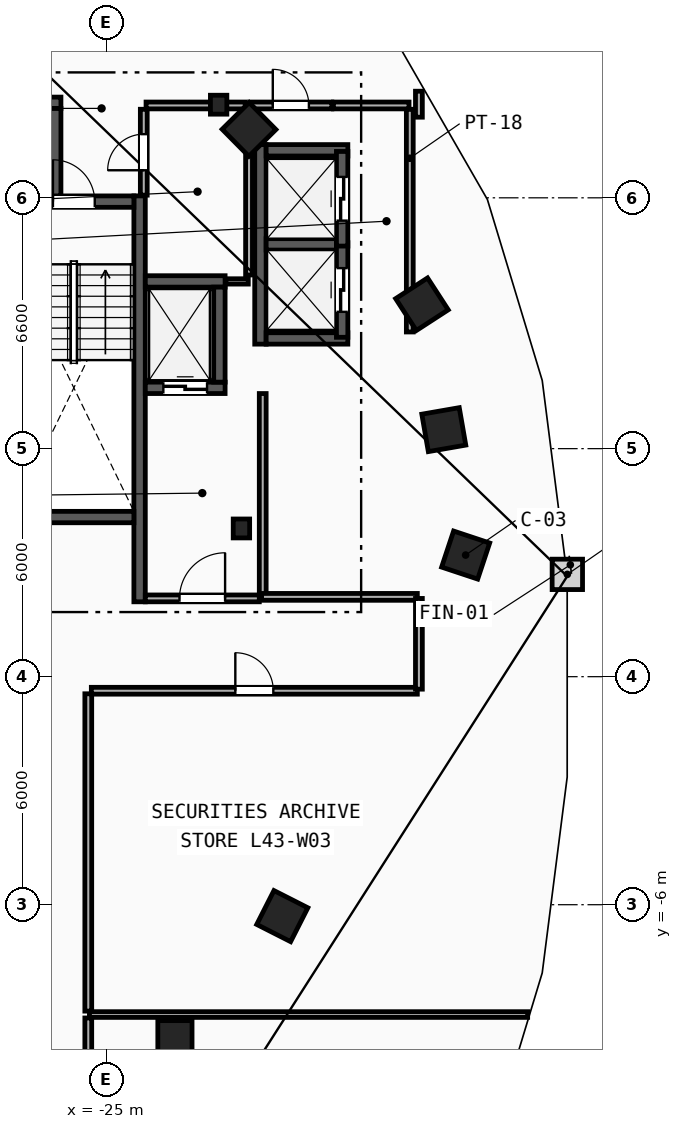
"""IFC4 building model, lengths in metres.
Left out: names, types, materials, properties, quantities, classifications, styles, units other than length and angle.
Written with IfcOpenShell. Run it as: python <this file> out.ifc"""

import sys

from ifc_helpers import new_model, si_unit, direction, frame, frame_2d, origin, origin_2d, place, context, subcontext, project, spatial, rectangle, i_section, extrude, element, fill, save


model = new_model("IFC4")
c1 = context("Model", 3, precision=1e-05, world=origin(), true_north=direction((0.0, 1.0)))
c2 = subcontext(c1, "Body", "Model", "MODEL_VIEW")
j1 = project(units=[si_unit("LENGTHUNIT", "METRE"), si_unit("PLANEANGLEUNIT", "RADIAN")], contexts=[c1])
p1 = place(None, origin())
s1 = spatial("IfcSite", under=j1, at=p1, CompositionType="ELEMENT")
p2 = place(p1, origin())
s2 = spatial("IfcBuilding", under=s1, at=p2, CompositionType="ELEMENT")
p3 = place(p2, frame((0.0, 0.0, 165.6)))
s3 = spatial("IfcBuildingStorey", under=s2, at=p3, CompositionType="ELEMENT", Elevation=165.6)
for number, where, z_axis, x_axis in (
    (1, (-21.45, 3.9, 0.0), (0.0, 0.0, 1.0), (1.0, 0.0, 0.0)),
    (2, (-22.05, 15.05, 0.0), (0.0, 0.0, 1.0), (1.0, 0.0, 0.0)),
):
    element("IfcColumn", number, at=place(p3, frame(where, z_axis=z_axis, x_axis=x_axis)), inside=s3, PredefinedType="COLUMN", context=c2, shape_type="SweptSolid", body=[
        extrude(i_section(OverallWidth=0.432, OverallDepth=0.498, WebThickness=0.056, FlangeThickness=0.089, FilletRadius=0.018, at=origin_2d()), origin(), (0.0, 0.0, 1.0), 3.6),
    ])
p4 = place(p3, frame((-23.2, -9.5, 0.0), z_axis=(0.0, 0.0, 1.0), x_axis=(1.0, 0.0, 0.0)))
e3 = element("IfcColumn", 3, at=p4, inside=s3, PredefinedType="COLUMN", context=c2, shape_type="SweptSolid", body=[
    extrude(rectangle(XDim=0.9, YDim=0.9, at=origin_2d()), origin(), (0.0, 0.0, 1.0), 3.6),
])
for number, where, z_axis, x_axis in (
    (4, (-15.55, 3.2, 0.0), (0.0, 0.0, 1.0), (0.315, 0.949, 0.0)),
    (5, (-16.125, 6.5, 0.0), (0.0, 0.0, 1.0), (-0.172, 0.985, 0.0)),
    (6, (-16.7, 9.8, 0.0), (0.0, 0.0, 1.0), (-0.544, 0.839, 0.0)),
    (7, (-21.25, 14.4, 0.0), (0.0, 0.0, 1.0), (-0.703, 0.711, 0.0)),
    (8, (-20.375, -6.3, 0.0), (0.0, 0.0, 1.0), (0.453, 0.892, 0.0)),
):
    element("IfcColumn", number, at=place(p3, frame(where, z_axis=z_axis, x_axis=x_axis)), inside=s3, PredefinedType="COLUMN", context=c2, shape_type="SweptSolid", body=[
        extrude(rectangle(XDim=1.0, YDim=1.0, at=origin_2d()), origin(), (0.0, 0.0, 1.0), 3.6),
    ])
p5 = place(p3, frame((-24.13, 1.97, 0.0), z_axis=(0.0, 0.0, 1.0), x_axis=(0.0, 1.0, 0.0)))
e9 = element("IfcWall", 9, at=p5, inside=s3, PredefinedType="SHEAR", context=c2, shape_type="SweptSolid", body=[
    extrude(rectangle(XDim=10.68, YDim=0.3, at=frame_2d((5.34, 0.0))), origin(), (0.0, 0.0, 1.0), 3.36),
])
p6 = place(p3, frame((-27.44, 12.5, 0.0), z_axis=(0.0, 0.0, 1.0), x_axis=(1.0, 0.0, 0.0)))
e10 = element("IfcWall", 10, at=p6, inside=s3, PredefinedType="SHEAR", context=c2, shape_type="SweptSolid", body=[
    extrude(rectangle(XDim=3.16, YDim=0.3, at=frame_2d((1.58, 0.0))), origin(), (0.0, 0.0, 1.0), 3.36),
])
p7 = place(p6, frame((1.03, 0.0, 0.0)))
e11 = element("IfcOpeningElement", 11, at=p7, cuts=e10, PredefinedType="OPENING", context=c2, shape_type="SweptSolid", body=[
    extrude(rectangle(XDim=1.1, YDim=2.15, at=frame_2d((0.55, 1.075))), frame((0.0, 0.16, 0.0), z_axis=(0.0, -1.0, 0.0), x_axis=(1.0, 0.0, 0.0)), (0.0, 0.0, 1.0), 0.32),
])
p8 = place(p3, frame((-27.44, 4.2, 0.0), z_axis=(0.0, 0.0, 1.0), x_axis=(1.0, 0.0, 0.0)))
e12 = element("IfcWall", 12, at=p8, inside=s3, PredefinedType="SHEAR", context=c2, shape_type="SweptSolid", body=[
    extrude(rectangle(XDim=3.16, YDim=0.3, at=frame_2d((1.58, 0.0))), origin(), (0.0, 0.0, 1.0), 3.36),
])
p9 = place(p3, frame((-20.89, 2.15, 0.0), z_axis=(0.0, 0.0, 1.0), x_axis=(0.0, 1.0, 0.0)))
e13 = element("IfcWall", 13, at=p9, inside=s3, PredefinedType="PARTITIONING", context=c2, shape_type="SweptSolid", body=[
    extrude(rectangle(XDim=5.3, YDim=0.18, at=frame_2d((2.65, 0.0))), origin(), (0.0, 0.0, 1.0), 3.36),
])
p10 = place(p3, frame((-23.98, 2.06, 0.0), z_axis=(0.0, 0.0, 1.0), x_axis=(1.0, 0.0, 0.0)))
e14 = element("IfcWall", 14, at=p10, inside=s3, PredefinedType="PARTITIONING", context=c2, shape_type="SweptSolid", body=[
    extrude(rectangle(XDim=3.0, YDim=0.18, at=frame_2d((1.5, 0.0))), origin(), (0.0, 0.0, 1.0), 3.36),
])
p11 = place(p10, frame((0.9, 0.0, 0.0)))
e15 = element("IfcOpeningElement", 15, at=p11, cuts=e14, PredefinedType="OPENING", context=c2, shape_type="SweptSolid", body=[
    extrude(rectangle(XDim=1.2, YDim=2.15, at=frame_2d((0.6, 1.075))), frame((0.0, 0.1, 0.0), z_axis=(0.0, -1.0, 0.0), x_axis=(1.0, 0.0, 0.0)), (0.0, 0.0, 1.0), 0.2),
])
p12 = place(p3, frame((-23.98, 7.6, 0.0), z_axis=(0.0, 0.0, 1.0), x_axis=(1.0, 0.0, 0.0)))
e16 = element("IfcWall", 16, at=p12, inside=s3, PredefinedType="SHEAR", context=c2, shape_type="SweptSolid", body=[
    extrude(rectangle(XDim=2.1, YDim=0.3, at=frame_2d((1.05, 0.0))), origin(), (0.0, 0.0, 1.0), 3.36),
])
p13 = place(p12, frame((0.475, 0.0, 0.0)))
e17 = element("IfcOpeningElement", 17, at=p13, cuts=e16, PredefinedType="OPENING", context=c2, shape_type="SweptSolid", body=[
    extrude(rectangle(XDim=1.15, YDim=2.2, at=frame_2d((0.575, 1.1))), frame((0.0, 0.16, 0.0), z_axis=(0.0, -1.0, 0.0), x_axis=(1.0, 0.0, 0.0)), (0.0, 0.0, 1.0), 0.32),
])
p14 = place(p3, frame((-23.98, 10.4, 0.0), z_axis=(0.0, 0.0, 1.0), x_axis=(1.0, 0.0, 0.0)))
e18 = element("IfcWall", 18, at=p14, inside=s3, PredefinedType="SHEAR", context=c2, shape_type="SweptSolid", body=[
    extrude(rectangle(XDim=2.1, YDim=0.3, at=frame_2d((1.05, 0.0))), origin(), (0.0, 0.0, 1.0), 3.36),
])
for number, where, z_axis, x_axis in (
    (19, (-22.03, 7.75, 0.0), (0.0, 0.0, 1.0), (0.0, 1.0, 0.0)),
    (20, (-28.7, 15.1, 0.0), (0.0, 0.0, 1.0), (1.0, 0.0, 0.0)),
):
    element("IfcWall", number, at=place(p3, frame(where, z_axis=z_axis, x_axis=x_axis)), inside=s3, PredefinedType="SHEAR", context=c2, shape_type="SweptSolid", body=[
        extrude(rectangle(XDim=2.5, YDim=0.3, at=frame_2d((1.25, 0.0))), origin(), (0.0, 0.0, 1.0), 3.36),
    ])
p15 = place(p3, frame((-26.35, 12.65, 0.0), z_axis=(0.0, 0.0, 1.0), x_axis=(0.0, 1.0, 0.0)))
e21 = element("IfcWall", 21, at=p15, inside=s3, PredefinedType="SHEAR", context=c2, shape_type="SweptSolid", body=[
    extrude(rectangle(XDim=2.3, YDim=0.3, at=frame_2d((1.15, 0.0))), origin(), (0.0, 0.0, 1.0), 3.36),
])
p16 = place(p3, frame((-20.95, 8.75, 0.0), z_axis=(0.0, 0.0, 1.0), x_axis=(0.0, 1.0, 0.0)))
e22 = element("IfcWall", 22, at=p16, inside=s3, PredefinedType="SHEAR", context=c2, shape_type="SweptSolid", body=[
    extrude(rectangle(XDim=5.25, YDim=0.3, at=frame_2d((2.625, 0.0))), origin(), (0.0, 0.0, 1.0), 3.36),
])
for number, where, z_axis, x_axis in (
    (23, (-20.8, 8.9, 0.0), (0.0, 0.0, 1.0), (1.0, 0.0, 0.0)),
    (24, (-20.8, 13.85, 0.0), (0.0, 0.0, 1.0), (1.0, 0.0, 0.0)),
):
    element("IfcWall", number, at=place(p3, frame(where, z_axis=z_axis, x_axis=x_axis)), inside=s3, PredefinedType="SHEAR", context=c2, shape_type="SweptSolid", body=[
        extrude(rectangle(XDim=2.15, YDim=0.3, at=frame_2d((1.075, 0.0))), origin(), (0.0, 0.0, 1.0), 3.36),
    ])
p17 = place(p3, frame((-20.8, 11.375, 0.0), z_axis=(0.0, 0.0, 1.0), x_axis=(1.0, 0.0, 0.0)))
e25 = element("IfcWall", 25, at=p17, inside=s3, PredefinedType="SHEAR", context=c2, shape_type="SweptSolid", body=[
    extrude(rectangle(XDim=1.85, YDim=0.3, at=frame_2d((0.925, 0.0))), origin(), (0.0, 0.0, 1.0), 3.36),
])
p18 = place(p3, frame((-18.8, 8.93, 0.0), z_axis=(0.0, 0.0, 1.0), x_axis=(0.0, 1.0, 0.0)))
e26 = element("IfcWall", 26, at=p18, inside=s3, PredefinedType="SHEAR", context=c2, shape_type="SweptSolid", body=[
    extrude(rectangle(XDim=2.49, YDim=0.3, at=frame_2d((1.245, 0.0))), origin(), (0.0, 0.0, 1.0), 3.36),
])
p19 = place(p18, frame((0.67, 0.0, 0.0)))
e27 = element("IfcOpeningElement", 27, at=p19, cuts=e26, PredefinedType="OPENING", context=c2, shape_type="SweptSolid", body=[
    extrude(rectangle(XDim=1.15, YDim=2.2, at=frame_2d((0.575, 1.1))), frame((0.0, 0.16, 0.0), z_axis=(0.0, -1.0, 0.0), x_axis=(1.0, 0.0, 0.0)), (0.0, 0.0, 1.0), 0.32),
])
p20 = place(p3, frame((-18.8, 11.33, 0.0), z_axis=(0.0, 0.0, 1.0), x_axis=(0.0, 1.0, 0.0)))
e28 = element("IfcWall", 28, at=p20, inside=s3, PredefinedType="SHEAR", context=c2, shape_type="SweptSolid", body=[
    extrude(rectangle(XDim=2.49, YDim=0.3, at=frame_2d((1.245, 0.0))), origin(), (0.0, 0.0, 1.0), 3.36),
])
p21 = place(p20, frame((0.67, 0.0, 0.0)))
e29 = element("IfcOpeningElement", 29, at=p21, cuts=e28, PredefinedType="OPENING", context=c2, shape_type="SweptSolid", body=[
    extrude(rectangle(XDim=1.15, YDim=2.2, at=frame_2d((0.575, 1.1))), frame((0.0, 0.16, 0.0), z_axis=(0.0, -1.0, 0.0), x_axis=(1.0, 0.0, 0.0)), (0.0, 0.0, 1.0), 0.32),
])
p22 = place(p3, frame((-17.02, 9.07, 0.0), z_axis=(0.0, 0.0, 1.0), x_axis=(0.0, 1.0, 0.0)))
e30 = element("IfcWall", 30, at=p22, inside=s3, PredefinedType="PARTITIONING", context=c2, shape_type="SweptSolid", body=[
    extrude(rectangle(XDim=5.86, YDim=0.18, at=frame_2d((2.93, 0.0))), origin(), (0.0, 0.0, 1.0), 3.36),
])
p23 = place(p3, frame((-21.23, 15.03, 0.0), z_axis=(0.0, 0.0, 1.0), x_axis=(1.0, 0.0, 0.0)))
e31 = element("IfcWall", 31, at=p23, inside=s3, PredefinedType="PARTITIONING", context=c2, shape_type="SweptSolid", body=[
    extrude(rectangle(XDim=2.16, YDim=0.18, at=frame_2d((1.08, 0.0))), origin(), (0.0, 0.0, 1.0), 3.36),
])
p24 = place(p23, frame((0.605, 0.0, 0.0)))
e32 = element("IfcOpeningElement", 32, at=p24, cuts=e31, PredefinedType="OPENING", context=c2, shape_type="SweptSolid", body=[
    extrude(rectangle(XDim=0.95, YDim=2.1, at=frame_2d((0.475, 1.05))), frame((0.0, 0.1, 0.0), z_axis=(0.0, -1.0, 0.0), x_axis=(1.0, 0.0, 0.0)), (0.0, 0.0, 1.0), 0.2),
])
p25 = place(p3, frame((-19.03, 15.03, 0.0), z_axis=(0.0, 0.0, 1.0), x_axis=(1.0, 0.0, 0.0)))
e33 = element("IfcWall", 33, at=p25, inside=s3, PredefinedType="PARTITIONING", context=c2, shape_type="SweptSolid", body=[
    extrude(rectangle(XDim=1.99, YDim=0.18, at=frame_2d((0.995, 0.0))), origin(), (0.0, 0.0, 1.0), 3.36),
])
p26 = place(p3, frame((-21.86, 10.4, 0.0), z_axis=(0.0, 0.0, 1.0), x_axis=(1.0, 0.0, 0.0)))
e34 = element("IfcWall", 34, at=p26, inside=s3, PredefinedType="PARTITIONING", context=c2, shape_type="SweptSolid", body=[
    extrude(rectangle(XDim=0.59, YDim=0.14, at=frame_2d((0.295, 0.0))), origin(), (0.0, 0.0, 1.0), 3.36),
])
p27 = place(p3, frame((-21.25, 10.57, 0.0), z_axis=(0.0, 0.0, 1.0), x_axis=(0.0, 1.0, 0.0)))
e35 = element("IfcWall", 35, at=p27, inside=s3, PredefinedType="PARTITIONING", context=c2, shape_type="SweptSolid", body=[
    extrude(rectangle(XDim=4.36, YDim=0.18, at=frame_2d((2.18, 0.0))), origin(), (0.0, 0.0, 1.0), 3.36),
])
p28 = place(p3, frame((-23.96, 15.03, 0.0), z_axis=(0.0, 0.0, 1.0), x_axis=(1.0, 0.0, 0.0)))
e36 = element("IfcWall", 36, at=p28, inside=s3, PredefinedType="PARTITIONING", context=c2, shape_type="SweptSolid", body=[
    extrude(rectangle(XDim=2.61, YDim=0.18, at=frame_2d((1.305, 0.0))), origin(), (0.0, 0.0, 1.0), 2.433),
])
p29 = place(p3, frame((-24.02, 12.67, 0.0), z_axis=(0.0, 0.0, 1.0), x_axis=(0.0, 1.0, 0.0)))
e37 = element("IfcWall", 37, at=p29, inside=s3, PredefinedType="PARTITIONING", context=c2, shape_type="SweptSolid", body=[
    extrude(rectangle(XDim=2.26, YDim=0.18, at=frame_2d((1.13, 0.0))), origin(), (0.0, 0.0, 1.0), 3.36),
])
p30 = place(p29, frame((0.655, 0.0, 0.0)))
e38 = element("IfcOpeningElement", 38, at=p30, cuts=e37, PredefinedType="OPENING", context=c2, shape_type="SweptSolid", body=[
    extrude(rectangle(XDim=0.95, YDim=2.1, at=frame_2d((0.475, 1.05))), frame((0.0, 0.1, 0.0), z_axis=(0.0, -1.0, 0.0), x_axis=(1.0, 0.0, 0.0)), (0.0, 0.0, 1.0), 0.2),
])
p31 = place(p3, frame((-25.45, -8.89, 0.0), z_axis=(0.0, 0.0, 1.0), x_axis=(1.0, 0.0, 0.0)))
e39 = element("IfcWall", 39, at=p31, inside=s3, PredefinedType="PARTITIONING", context=c2, shape_type="SweptSolid", body=[
    extrude(rectangle(XDim=11.532, YDim=0.15, at=frame_2d((5.766, 0.0))), origin(), (0.0, 0.0, 1.0), 3.36),
])
p32 = place(p3, frame((-25.48, -11.178, 0.0), z_axis=(0.0, 0.0, 1.0), x_axis=(0.0, 1.0, 0.0)))
e40 = element("IfcWall", 40, at=p32, inside=s3, PredefinedType="PARTITIONING", context=c2, shape_type="SweptSolid", body=[
    extrude(rectangle(XDim=2.198, YDim=0.18, at=frame_2d((1.099, 0.0))), origin(), (0.0, 0.0, 1.0), 3.36),
])
p33 = place(p3, frame((-25.4, -0.37, 0.0), z_axis=(0.0, 0.0, 1.0), x_axis=(1.0, 0.0, 0.0)))
e41 = element("IfcWall", 41, at=p33, inside=s3, PredefinedType="PARTITIONING", context=c2, shape_type="SweptSolid", body=[
    extrude(rectangle(XDim=8.578, YDim=0.18, at=frame_2d((4.289, 0.0))), origin(), (0.0, 0.0, 1.0), 3.36),
])
p34 = place(p33, frame((3.789, 0.0, 0.0)))
e42 = element("IfcOpeningElement", 42, at=p34, cuts=e41, PredefinedType="OPENING", context=c2, shape_type="SweptSolid", body=[
    extrude(rectangle(XDim=1.0, YDim=2.15, at=frame_2d((0.5, 1.075))), frame((0.0, 0.1, 0.0), z_axis=(0.0, -1.0, 0.0), x_axis=(1.0, 0.0, 0.0)), (0.0, 0.0, 1.0), 0.2),
])
p35 = place(p3, frame((-25.48, -8.8, 0.0), z_axis=(0.0, 0.0, 1.0), x_axis=(0.0, 1.0, 0.0)))
e43 = element("IfcWall", 43, at=p35, inside=s3, PredefinedType="PARTITIONING", context=c2, shape_type="SweptSolid", body=[
    extrude(rectangle(XDim=8.35, YDim=0.18, at=frame_2d((4.175, 0.0))), origin(), (0.0, 0.0, 1.0), 3.36),
])
p36 = place(p3, frame((-16.822, 2.1, 0.0), z_axis=(0.0, 0.0, 1.0), x_axis=(-1.0, 0.0, 0.0)))
e44 = element("IfcWall", 44, at=p36, inside=s3, PredefinedType="PARTITIONING", context=c2, shape_type="SweptSolid", body=[
    extrude(rectangle(XDim=4.098, YDim=0.18, at=frame_2d((2.049, 0.0))), origin(), (0.0, 0.0, 1.0), 3.36),
])
p37 = place(p3, frame((-16.78, -0.329, 0.0), z_axis=(0.0, 0.0, 1.0), x_axis=(0.0, 1.0, 0.0)))
e45 = element("IfcWall", 45, at=p37, inside=s3, PredefinedType="PARTITIONING", context=c2, shape_type="SweptSolid", body=[
    extrude(rectangle(XDim=2.387, YDim=0.18, at=frame_2d((1.194, 0.0))), origin(), (0.0, 0.0, 1.0), 3.36),
])
p38 = place(p3, frame((-16.78, 14.721, 0.0), z_axis=(0.0, 0.0, 1.0), x_axis=(0.0, 1.0, 0.0)))
e46 = element("IfcWall", 46, at=p38, inside=s3, PredefinedType="PARTITIONING", context=c2, shape_type="SweptSolid", body=[
    extrude(rectangle(XDim=0.684, YDim=0.18, at=frame_2d((0.342, 0.0))), origin(), (0.0, 0.0, 1.0), 3.36),
])
p39 = place(p7, origin())
e47 = element("IfcDoor", 47, at=p39, inside=s3, OperationType="SINGLE_SWING_LEFT", PredefinedType="DOOR", context=c2, shape_type="SweptSolid", body=[
    extrude(rectangle(XDim=1.1, YDim=2.15, at=frame_2d((0.55, 1.075))), frame((0.0, 0.025, 0.0), z_axis=(0.0, -1.0, 0.0), x_axis=(1.0, 0.0, 0.0)), (0.0, 0.0, 1.0), 0.05),
])
fill(e11, e47)
p40 = place(p11, origin())
e48 = element("IfcDoor", 48, at=p40, inside=s3, OperationType="SINGLE_SWING_RIGHT", PredefinedType="DOOR", context=c2, shape_type="SweptSolid", body=[
    extrude(rectangle(XDim=1.2, YDim=2.15, at=frame_2d((0.6, 1.075))), frame((0.0, 0.025, 0.0), z_axis=(0.0, -1.0, 0.0), x_axis=(1.0, 0.0, 0.0)), (0.0, 0.0, 1.0), 0.05),
])
fill(e15, e48)
p41 = place(p13, origin())
e49 = element("IfcDoor", 49, at=p41, inside=s3, OperationType="SLIDING_TO_LEFT", PredefinedType="TRAPDOOR", context=c2, shape_type="SweptSolid", body=[
    extrude(rectangle(XDim=1.15, YDim=2.2, at=frame_2d((0.575, 1.1))), frame((0.0, 0.025, 0.0), z_axis=(0.0, -1.0, 0.0), x_axis=(1.0, 0.0, 0.0)), (0.0, 0.0, 1.0), 0.05),
])
fill(e17, e49)
p42 = place(p19, origin())
e50 = element("IfcDoor", 50, at=p42, inside=s3, OperationType="SLIDING_TO_LEFT", PredefinedType="TRAPDOOR", context=c2, shape_type="SweptSolid", body=[
    extrude(rectangle(XDim=1.15, YDim=2.2, at=frame_2d((0.575, 1.1))), frame((0.0, 0.025, 0.0), z_axis=(0.0, -1.0, 0.0), x_axis=(1.0, 0.0, 0.0)), (0.0, 0.0, 1.0), 0.05),
])
fill(e27, e50)
p43 = place(p21, origin())
e51 = element("IfcDoor", 51, at=p43, inside=s3, OperationType="SLIDING_TO_LEFT", PredefinedType="TRAPDOOR", context=c2, shape_type="SweptSolid", body=[
    extrude(rectangle(XDim=1.15, YDim=2.2, at=frame_2d((0.575, 1.1))), frame((0.0, 0.025, 0.0), z_axis=(0.0, -1.0, 0.0), x_axis=(1.0, 0.0, 0.0)), (0.0, 0.0, 1.0), 0.05),
])
fill(e29, e51)
p44 = place(p34, origin())
e52 = element("IfcDoor", 52, at=p44, inside=s3, OperationType="SINGLE_SWING_LEFT", PredefinedType="DOOR", context=c2, shape_type="SweptSolid", body=[
    extrude(rectangle(XDim=1.0, YDim=2.15, at=frame_2d((0.5, 1.075))), frame((0.0, 0.025, 0.0), z_axis=(0.0, -1.0, 0.0), x_axis=(1.0, 0.0, 0.0)), (0.0, 0.0, 1.0), 0.05),
])
fill(e42, e52)
p45 = place(p30, origin())
e53 = element("IfcDoor", 53, at=p45, inside=s3, OperationType="SINGLE_SWING_LEFT", PredefinedType="DOOR", context=c2, shape_type="SweptSolid", body=[
    extrude(rectangle(XDim=0.95, YDim=2.1, at=frame_2d((0.475, 1.05))), frame((0.0, 0.025, 0.0), z_axis=(0.0, -1.0, 0.0), x_axis=(1.0, 0.0, 0.0)), (0.0, 0.0, 1.0), 0.05),
])
fill(e38, e53)
p46 = place(p24, origin())
e54 = element("IfcDoor", 54, at=p46, inside=s3, OperationType="SINGLE_SWING_LEFT", PredefinedType="DOOR", context=c2, shape_type="SweptSolid", body=[
    extrude(rectangle(XDim=0.95, YDim=2.1, at=frame_2d((0.475, 1.05))), frame((0.0, 0.025, 0.0), z_axis=(0.0, -1.0, 0.0), x_axis=(1.0, 0.0, 0.0)), (0.0, 0.0, 1.0), 0.05),
])
fill(e32, e54)
save(model, sys.argv[1])
